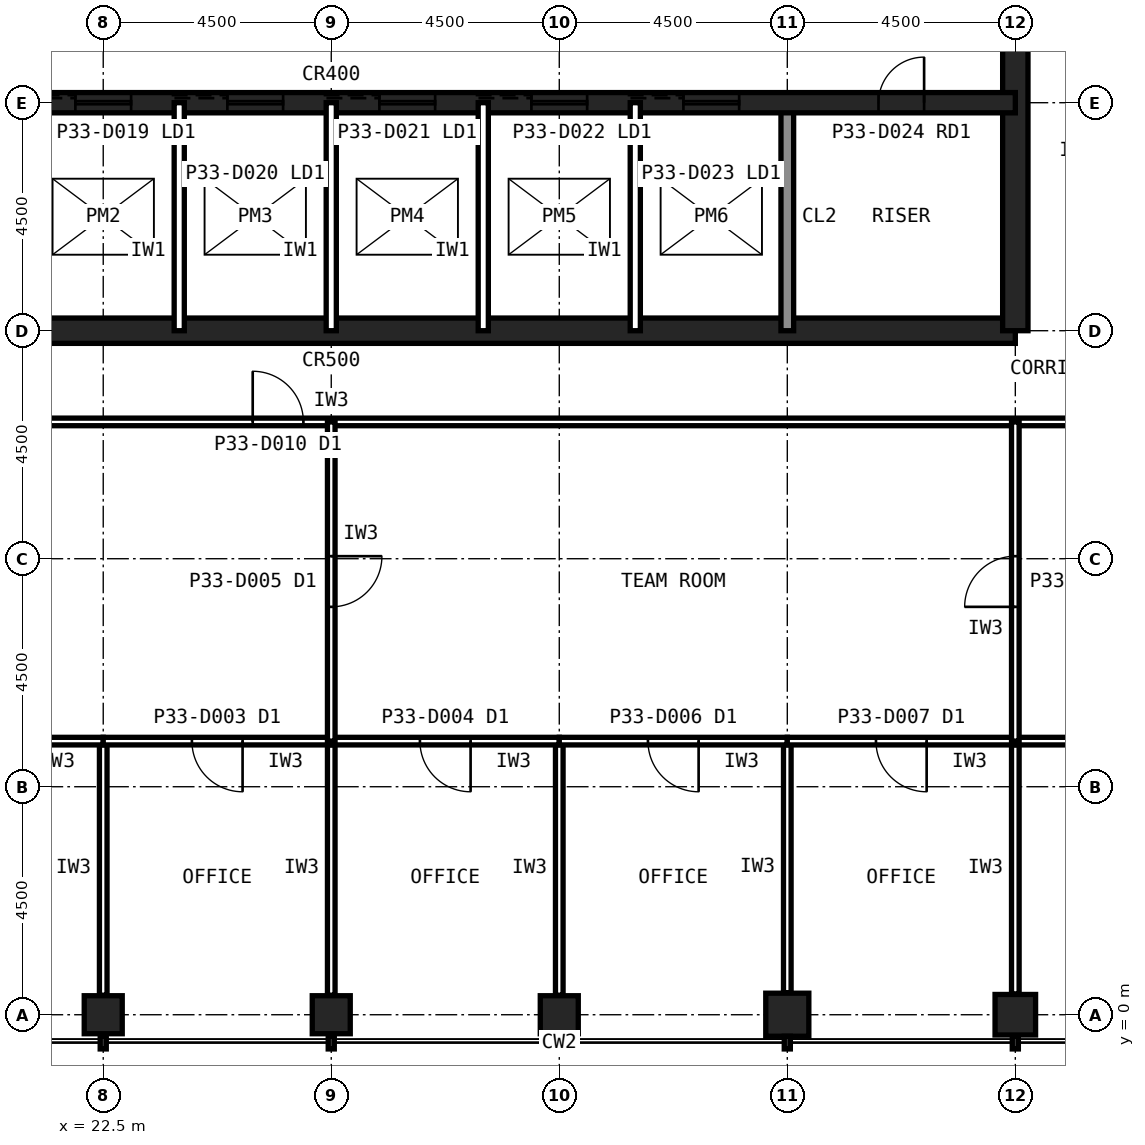
"""IFC4 building model, lengths in metres.
Left out: names, types, materials, properties, quantities, classifications, styles, units other than length and angle.
Written with IfcOpenShell. Run it as: python <this file> out.ifc"""

import sys

from ifc_helpers import new_model, si_unit, direction, frame, frame_2d, origin, origin_2d, place, context, subcontext, project, spatial, rectangle, hollow_rectangle, extrude, element, fill, save


model = new_model("IFC4")
c1 = context("Model", 3, precision=1e-05, world=origin(), true_north=direction((0.0, 1.0)))
c2 = subcontext(c1, "Body", "Model", "MODEL_VIEW")
j1 = project(units=[si_unit("LENGTHUNIT", "METRE"), si_unit("PLANEANGLEUNIT", "RADIAN")], contexts=[c1])
p1 = place(None, origin())
s1 = spatial("IfcSite", under=j1, at=p1, CompositionType="ELEMENT")
p2 = place(p1, origin())
s2 = spatial("IfcBuilding", under=s1, at=p2, CompositionType="ELEMENT")
p3 = place(p2, frame((0.0, 0.0, 143.6)))
s3 = spatial("IfcBuildingStorey", under=s2, at=p3, CompositionType="ELEMENT", Elevation=143.6)
for number, where, z_axis, x_axis in (
    (1, (22.5, 0.0, 0.0), (0.0, 0.0, 1.0), (1.0, 0.0, 0.0)),
    (2, (27.0, 0.0, 0.0), (0.0, 0.0, 1.0), (1.0, 0.0, 0.0)),
    (3, (31.5, 0.0, 0.0), (0.0, 0.0, 1.0), (1.0, 0.0, 0.0)),
):
    element("IfcColumn", number, at=place(p3, frame(where, z_axis=z_axis, x_axis=x_axis)), inside=s3, PredefinedType="COLUMN", context=c2, shape_type="SweptSolid", body=[
        extrude(hollow_rectangle(XDim=0.75, YDim=0.75, WallThickness=0.04, at=origin_2d()), origin(), (0.0, 0.0, 1.0), 4.0),
    ])
p4 = place(p3, frame((36.0, 0.0, 0.0), z_axis=(0.0, 0.0, 1.0), x_axis=(1.0, 0.0, 0.0)))
e4 = element("IfcColumn", 4, at=p4, inside=s3, PredefinedType="COLUMN", context=c2, shape_type="SweptSolid", body=[
    extrude(hollow_rectangle(XDim=0.85, YDim=0.85, WallThickness=0.05, at=origin_2d()), origin(), (0.0, 0.0, 1.0), 4.0),
])
p5 = place(p3, frame((40.5, 0.0, 0.0), z_axis=(0.0, 0.0, 1.0), x_axis=(1.0, 0.0, 0.0)))
e5 = element("IfcColumn", 5, at=p5, inside=s3, PredefinedType="COLUMN", context=c2, shape_type="SweptSolid", body=[
    extrude(hollow_rectangle(XDim=0.8, YDim=0.8, WallThickness=0.045, at=origin_2d()), origin(), (0.0, 0.0, 1.0), 4.0),
])
p6 = place(p3, frame((13.5, 13.5, 0.0), z_axis=(0.0, 0.0, 1.0), x_axis=(1.0, 0.0, 0.0)))
e6 = element("IfcWall", 6, at=p6, inside=s3, PredefinedType="SHEAR", context=c2, shape_type="SweptSolid", body=[
    extrude(rectangle(XDim=27.0, YDim=0.5, at=frame_2d((13.5, 0.0))), origin(), (0.0, 0.0, 1.0), 4.0),
])
p7 = place(p3, frame((40.5, 13.5, 0.0), z_axis=(0.0, 0.0, 1.0), x_axis=(0.0, 1.0, 0.0)))
e7 = element("IfcWall", 7, at=p7, inside=s3, PredefinedType="SHEAR", context=c2, shape_type="SweptSolid", body=[
    extrude(rectangle(XDim=27.0, YDim=0.5, at=frame_2d((13.5, 0.0))), origin(), (0.0, 0.0, 1.0), 4.0),
])
p8 = place(p7, frame((5.85, 0.0, 0.0)))
e8 = element("IfcOpeningElement", 8, at=p8, cuts=e7, PredefinedType="OPENING", context=c2, shape_type="SweptSolid", body=[
    extrude(rectangle(XDim=1.8, YDim=2.1, at=frame_2d((0.9, 1.05))), frame((0.0, 0.26, 0.0), z_axis=(0.0, -1.0, 0.0), x_axis=(1.0, 0.0, 0.0)), (0.0, 0.0, 1.0), 0.52),
])
p9 = place(p7, frame((19.65, 0.0, 0.0)))
e9 = element("IfcOpeningElement", 9, at=p9, cuts=e7, PredefinedType="OPENING", context=c2, shape_type="SweptSolid", body=[
    extrude(rectangle(XDim=1.2, YDim=2.1, at=frame_2d((0.6, 1.05))), frame((0.0, 0.26, 0.0), z_axis=(0.0, -1.0, 0.0), x_axis=(1.0, 0.0, 0.0)), (0.0, 0.0, 1.0), 0.52),
])
p10 = place(p3, frame((36.0, 13.5, 0.0), z_axis=(0.0, 0.0, 1.0), x_axis=(0.0, 1.0, 0.0)))
e10 = element("IfcWall", 10, at=p10, inside=s3, PredefinedType="SOLIDWALL", context=c2, shape_type="SweptSolid", body=[
    extrude(rectangle(XDim=4.5, YDim=0.25, at=frame_2d((2.25, 0.0))), origin(), (0.0, 0.0, 1.0), 3.84),
])
p11 = place(p3, frame((13.5, 18.0, 0.0), z_axis=(0.0, 0.0, 1.0), x_axis=(1.0, 0.0, 0.0)))
e11 = element("IfcWall", 11, at=p11, inside=s3, PredefinedType="SHEAR", context=c2, shape_type="SweptSolid", body=[
    extrude(rectangle(XDim=27.0, YDim=0.4, at=frame_2d((13.5, 0.0))), origin(), (0.0, 0.0, 1.0), 4.0),
])
p12 = place(p11, frame((24.3, 0.0, 0.0)))
e12 = element("IfcOpeningElement", 12, at=p12, cuts=e11, PredefinedType="OPENING", context=c2, shape_type="SweptSolid", body=[
    extrude(rectangle(XDim=0.9, YDim=2.1, at=frame_2d((0.45, 1.05))), frame((0.0, 0.21, 0.0), z_axis=(0.0, -1.0, 0.0), x_axis=(1.0, 0.0, 0.0)), (0.0, 0.0, 1.0), 0.42),
])
p13 = place(p11, frame((5.45, 0.0, 0.0)))
e13 = element("IfcOpeningElement", 13, at=p13, cuts=e11, PredefinedType="OPENING", context=c2, shape_type="SweptSolid", body=[
    extrude(rectangle(XDim=1.1, YDim=2.1, at=frame_2d((0.55, 1.05))), frame((0.0, 0.21, 0.0), z_axis=(0.0, -1.0, 0.0), x_axis=(1.0, 0.0, 0.0)), (0.0, 0.0, 1.0), 0.42),
])
p14 = place(p11, frame((8.45, 0.0, 0.0)))
e14 = element("IfcOpeningElement", 14, at=p14, cuts=e11, PredefinedType="OPENING", context=c2, shape_type="SweptSolid", body=[
    extrude(rectangle(XDim=1.1, YDim=2.1, at=frame_2d((0.55, 1.05))), frame((0.0, 0.21, 0.0), z_axis=(0.0, -1.0, 0.0), x_axis=(1.0, 0.0, 0.0)), (0.0, 0.0, 1.0), 0.42),
])
p15 = place(p11, frame((11.45, 0.0, 0.0)))
e15 = element("IfcOpeningElement", 15, at=p15, cuts=e11, PredefinedType="OPENING", context=c2, shape_type="SweptSolid", body=[
    extrude(rectangle(XDim=1.1, YDim=2.1, at=frame_2d((0.55, 1.05))), frame((0.0, 0.21, 0.0), z_axis=(0.0, -1.0, 0.0), x_axis=(1.0, 0.0, 0.0)), (0.0, 0.0, 1.0), 0.42),
])
p16 = place(p11, frame((14.45, 0.0, 0.0)))
e16 = element("IfcOpeningElement", 16, at=p16, cuts=e11, PredefinedType="OPENING", context=c2, shape_type="SweptSolid", body=[
    extrude(rectangle(XDim=1.1, YDim=2.1, at=frame_2d((0.55, 1.05))), frame((0.0, 0.21, 0.0), z_axis=(0.0, -1.0, 0.0), x_axis=(1.0, 0.0, 0.0)), (0.0, 0.0, 1.0), 0.42),
])
p17 = place(p11, frame((17.45, 0.0, 0.0)))
e17 = element("IfcOpeningElement", 17, at=p17, cuts=e11, PredefinedType="OPENING", context=c2, shape_type="SweptSolid", body=[
    extrude(rectangle(XDim=1.1, YDim=2.1, at=frame_2d((0.55, 1.05))), frame((0.0, 0.21, 0.0), z_axis=(0.0, -1.0, 0.0), x_axis=(1.0, 0.0, 0.0)), (0.0, 0.0, 1.0), 0.42),
])
p18 = place(p11, frame((20.45, 0.0, 0.0)))
e18 = element("IfcOpeningElement", 18, at=p18, cuts=e11, PredefinedType="OPENING", context=c2, shape_type="SweptSolid", body=[
    extrude(rectangle(XDim=1.1, YDim=2.1, at=frame_2d((0.55, 1.05))), frame((0.0, 0.21, 0.0), z_axis=(0.0, -1.0, 0.0), x_axis=(1.0, 0.0, 0.0)), (0.0, 0.0, 1.0), 0.42),
])
p19 = place(p11, frame((1.6, 0.0, 0.0)))
e19 = element("IfcOpeningElement", 19, at=p19, cuts=e11, PredefinedType="OPENING", context=c2, shape_type="SweptSolid", body=[
    extrude(rectangle(XDim=1.3, YDim=2.2, at=frame_2d((0.65, 1.1))), frame((0.0, 0.21, 0.0), z_axis=(0.0, -1.0, 0.0), x_axis=(1.0, 0.0, 0.0)), (0.0, 0.0, 1.0), 0.42),
])
for number, where, z_axis, x_axis in (
    (20, (24.0, 13.5, 0.0), (0.0, 0.0, 1.0), (0.0, 1.0, 0.0)),
    (21, (27.0, 13.5, 0.0), (0.0, 0.0, 1.0), (0.0, 1.0, 0.0)),
    (22, (30.0, 13.5, 0.0), (0.0, 0.0, 1.0), (0.0, 1.0, 0.0)),
    (23, (33.0, 13.5, 0.0), (0.0, 0.0, 1.0), (0.0, 1.0, 0.0)),
):
    element("IfcWall", number, at=place(p3, frame(where, z_axis=z_axis, x_axis=x_axis)), inside=s3, PredefinedType="PARTITIONING", context=c2, shape_type="SweptSolid", body=[
        extrude(rectangle(XDim=4.5, YDim=0.2, at=frame_2d((2.25, 0.0))), origin(), (0.0, 0.0, 1.0), 3.84),
    ])
p20 = place(p3, frame((11.7, 11.7, 0.0), z_axis=(0.0, 0.0, 1.0), x_axis=(1.0, 0.0, 0.0)))
e24 = element("IfcWall", 24, at=p20, inside=s3, PredefinedType="PARTITIONING", context=c2, shape_type="SweptSolid", body=[
    extrude(rectangle(XDim=30.6, YDim=0.15, at=frame_2d((15.3, 0.0))), origin(), (0.0, 0.0, 1.0), 3.84),
])
p21 = place(p20, frame((13.75, 0.0, 0.0)))
e25 = element("IfcOpeningElement", 25, at=p21, cuts=e24, PredefinedType="OPENING", context=c2, shape_type="SweptSolid", body=[
    extrude(rectangle(XDim=1.0, YDim=2.1, at=frame_2d((0.5, 1.05))), frame((0.0, 0.085, 0.0), z_axis=(0.0, -1.0, 0.0), x_axis=(1.0, 0.0, 0.0)), (0.0, 0.0, 1.0), 0.17),
])
p22 = place(p3, frame((22.5, 0.385, 0.0), z_axis=(0.0, 0.0, 1.0), x_axis=(0.0, 1.0, 0.0)))
e26 = element("IfcWall", 26, at=p22, inside=s3, PredefinedType="PARTITIONING", context=c2, shape_type="SweptSolid", body=[
    extrude(rectangle(XDim=5.015, YDim=0.15, at=frame_2d((2.507, 0.0))), origin(), (0.0, 0.0, 1.0), 2.989),
])
p23 = place(p3, frame((22.5, 5.4, 0.0), z_axis=(0.0, 0.0, 1.0), x_axis=(-1.0, 0.0, 0.0)))
e27 = element("IfcWall", 27, at=p23, inside=s3, PredefinedType="PARTITIONING", context=c2, shape_type="SweptSolid", body=[
    extrude(rectangle(XDim=4.5, YDim=0.15, at=frame_2d((2.25, 0.0))), origin(), (0.0, 0.0, 1.0), 3.84),
])
p24 = place(p23, frame((1.75, 0.0, 0.0)))
e28 = element("IfcOpeningElement", 28, at=p24, cuts=e27, PredefinedType="OPENING", context=c2, shape_type="SweptSolid", body=[
    extrude(rectangle(XDim=1.0, YDim=2.1, at=frame_2d((0.5, 1.05))), frame((0.0, 0.085, 0.0), z_axis=(0.0, -1.0, 0.0), x_axis=(1.0, 0.0, 0.0)), (0.0, 0.0, 1.0), 0.17),
])
p25 = place(p3, frame((27.0, 0.385, 0.0), z_axis=(0.0, 0.0, 1.0), x_axis=(0.0, 1.0, 0.0)))
e29 = element("IfcWall", 29, at=p25, inside=s3, PredefinedType="PARTITIONING", context=c2, shape_type="SweptSolid", body=[
    extrude(rectangle(XDim=5.015, YDim=0.15, at=frame_2d((2.507, 0.0))), origin(), (0.0, 0.0, 1.0), 2.989),
])
p26 = place(p3, frame((27.0, 5.4, 0.0), z_axis=(0.0, 0.0, 1.0), x_axis=(-1.0, 0.0, 0.0)))
e30 = element("IfcWall", 30, at=p26, inside=s3, PredefinedType="PARTITIONING", context=c2, shape_type="SweptSolid", body=[
    extrude(rectangle(XDim=4.5, YDim=0.15, at=frame_2d((2.25, 0.0))), origin(), (0.0, 0.0, 1.0), 3.84),
])
p27 = place(p26, frame((1.75, 0.0, 0.0)))
e31 = element("IfcOpeningElement", 31, at=p27, cuts=e30, PredefinedType="OPENING", context=c2, shape_type="SweptSolid", body=[
    extrude(rectangle(XDim=1.0, YDim=2.1, at=frame_2d((0.5, 1.05))), frame((0.0, 0.085, 0.0), z_axis=(0.0, -1.0, 0.0), x_axis=(1.0, 0.0, 0.0)), (0.0, 0.0, 1.0), 0.17),
])
p28 = place(p3, frame((31.5, 0.385, 0.0), z_axis=(0.0, 0.0, 1.0), x_axis=(0.0, 1.0, 0.0)))
e32 = element("IfcWall", 32, at=p28, inside=s3, PredefinedType="PARTITIONING", context=c2, shape_type="SweptSolid", body=[
    extrude(rectangle(XDim=5.015, YDim=0.15, at=frame_2d((2.507, 0.0))), origin(), (0.0, 0.0, 1.0), 2.989),
])
p29 = place(p3, frame((31.5, 5.4, 0.0), z_axis=(0.0, 0.0, 1.0), x_axis=(-1.0, 0.0, 0.0)))
e33 = element("IfcWall", 33, at=p29, inside=s3, PredefinedType="PARTITIONING", context=c2, shape_type="SweptSolid", body=[
    extrude(rectangle(XDim=4.5, YDim=0.15, at=frame_2d((2.25, 0.0))), origin(), (0.0, 0.0, 1.0), 3.84),
])
p30 = place(p29, frame((1.75, 0.0, 0.0)))
e34 = element("IfcOpeningElement", 34, at=p30, cuts=e33, PredefinedType="OPENING", context=c2, shape_type="SweptSolid", body=[
    extrude(rectangle(XDim=1.0, YDim=2.1, at=frame_2d((0.5, 1.05))), frame((0.0, 0.085, 0.0), z_axis=(0.0, -1.0, 0.0), x_axis=(1.0, 0.0, 0.0)), (0.0, 0.0, 1.0), 0.17),
])
p31 = place(p3, frame((36.0, 0.435, 0.0), z_axis=(0.0, 0.0, 1.0), x_axis=(0.0, 1.0, 0.0)))
e35 = element("IfcWall", 35, at=p31, inside=s3, PredefinedType="PARTITIONING", context=c2, shape_type="SweptSolid", body=[
    extrude(rectangle(XDim=4.965, YDim=0.15, at=frame_2d((2.482, 0.0))), origin(), (0.0, 0.0, 1.0), 2.989),
])
p32 = place(p3, frame((36.0, 5.4, 0.0), z_axis=(0.0, 0.0, 1.0), x_axis=(-1.0, 0.0, 0.0)))
e36 = element("IfcWall", 36, at=p32, inside=s3, PredefinedType="PARTITIONING", context=c2, shape_type="SweptSolid", body=[
    extrude(rectangle(XDim=4.5, YDim=0.15, at=frame_2d((2.25, 0.0))), origin(), (0.0, 0.0, 1.0), 3.84),
])
p33 = place(p32, frame((1.75, 0.0, 0.0)))
e37 = element("IfcOpeningElement", 37, at=p33, cuts=e36, PredefinedType="OPENING", context=c2, shape_type="SweptSolid", body=[
    extrude(rectangle(XDim=1.0, YDim=2.1, at=frame_2d((0.5, 1.05))), frame((0.0, 0.085, 0.0), z_axis=(0.0, -1.0, 0.0), x_axis=(1.0, 0.0, 0.0)), (0.0, 0.0, 1.0), 0.17),
])
p34 = place(p3, frame((40.5, 0.41, 0.0), z_axis=(0.0, 0.0, 1.0), x_axis=(0.0, 1.0, 0.0)))
e38 = element("IfcWall", 38, at=p34, inside=s3, PredefinedType="PARTITIONING", context=c2, shape_type="SweptSolid", body=[
    extrude(rectangle(XDim=4.99, YDim=0.15, at=frame_2d((2.495, 0.0))), origin(), (0.0, 0.0, 1.0), 2.989),
])
p35 = place(p3, frame((40.5, 5.4, 0.0), z_axis=(0.0, 0.0, 1.0), x_axis=(-1.0, 0.0, 0.0)))
e39 = element("IfcWall", 39, at=p35, inside=s3, PredefinedType="PARTITIONING", context=c2, shape_type="SweptSolid", body=[
    extrude(rectangle(XDim=4.5, YDim=0.15, at=frame_2d((2.25, 0.0))), origin(), (0.0, 0.0, 1.0), 3.84),
])
p36 = place(p35, frame((1.75, 0.0, 0.0)))
e40 = element("IfcOpeningElement", 40, at=p36, cuts=e39, PredefinedType="OPENING", context=c2, shape_type="SweptSolid", body=[
    extrude(rectangle(XDim=1.0, YDim=2.1, at=frame_2d((0.5, 1.05))), frame((0.0, 0.085, 0.0), z_axis=(0.0, -1.0, 0.0), x_axis=(1.0, 0.0, 0.0)), (0.0, 0.0, 1.0), 0.17),
])
p37 = place(p3, frame((45.0, 5.4, 0.0), z_axis=(0.0, 0.0, 1.0), x_axis=(-1.0, 0.0, 0.0)))
e41 = element("IfcWall", 41, at=p37, inside=s3, PredefinedType="PARTITIONING", context=c2, shape_type="SweptSolid", body=[
    extrude(rectangle(XDim=4.5, YDim=0.15, at=frame_2d((2.25, 0.0))), origin(), (0.0, 0.0, 1.0), 3.84),
])
p38 = place(p37, frame((1.75, 0.0, 0.0)))
e42 = element("IfcOpeningElement", 42, at=p38, cuts=e41, PredefinedType="OPENING", context=c2, shape_type="SweptSolid", body=[
    extrude(rectangle(XDim=1.0, YDim=2.1, at=frame_2d((0.5, 1.05))), frame((0.0, 0.085, 0.0), z_axis=(0.0, -1.0, 0.0), x_axis=(1.0, 0.0, 0.0)), (0.0, 0.0, 1.0), 0.17),
])
p39 = place(p3, frame((40.5, 5.4, 0.0), z_axis=(0.0, 0.0, 1.0), x_axis=(0.0, 1.0, 0.0)))
e43 = element("IfcWall", 43, at=p39, inside=s3, PredefinedType="PARTITIONING", context=c2, shape_type="SweptSolid", body=[
    extrude(rectangle(XDim=6.3, YDim=0.15, at=frame_2d((3.15, 0.0))), origin(), (0.0, 0.0, 1.0), 2.989),
])
p40 = place(p39, frame((2.65, 0.0, 0.0)))
e44 = element("IfcOpeningElement", 44, at=p40, cuts=e43, PredefinedType="OPENING", context=c2, shape_type="SweptSolid", body=[
    extrude(rectangle(XDim=1.0, YDim=2.1, at=frame_2d((0.5, 1.05))), frame((0.0, 0.085, 0.0), z_axis=(0.0, -1.0, 0.0), x_axis=(1.0, 0.0, 0.0)), (0.0, 0.0, 1.0), 0.17),
])
p41 = place(p3, frame((27.0, 11.7, 0.0), z_axis=(0.0, 0.0, 1.0), x_axis=(0.0, -1.0, 0.0)))
e45 = element("IfcWall", 45, at=p41, inside=s3, PredefinedType="PARTITIONING", context=c2, shape_type="SweptSolid", body=[
    extrude(rectangle(XDim=6.3, YDim=0.15, at=frame_2d((3.15, 0.0))), origin(), (0.0, 0.0, 1.0), 2.989),
])
p42 = place(p41, frame((2.65, 0.0, 0.0)))
e46 = element("IfcOpeningElement", 46, at=p42, cuts=e45, PredefinedType="OPENING", context=c2, shape_type="SweptSolid", body=[
    extrude(rectangle(XDim=1.0, YDim=2.1, at=frame_2d((0.5, 1.05))), frame((0.0, 0.085, 0.0), z_axis=(0.0, -1.0, 0.0), x_axis=(1.0, 0.0, 0.0)), (0.0, 0.0, 1.0), 0.17),
])
p43 = place(p12, origin())
e47 = element("IfcDoor", 47, at=p43, inside=s3, OperationType="SINGLE_SWING_RIGHT", PredefinedType="DOOR", context=c2, shape_type="SweptSolid", body=[
    extrude(rectangle(XDim=0.9, YDim=2.1, at=frame_2d((0.45, 1.05))), frame((0.0, 0.025, 0.0), z_axis=(0.0, -1.0, 0.0), x_axis=(1.0, 0.0, 0.0)), (0.0, 0.0, 1.0), 0.05),
])
fill(e12, e47)
p44 = place(p14, origin())
e48 = element("IfcDoor", 48, at=p44, inside=s3, OperationType="SLIDING_TO_LEFT", PredefinedType="DOOR", context=c2, shape_type="SweptSolid", body=[
    extrude(rectangle(XDim=1.1, YDim=2.1, at=frame_2d((0.55, 1.05))), frame((0.0, 0.025, 0.0), z_axis=(0.0, -1.0, 0.0), x_axis=(1.0, 0.0, 0.0)), (0.0, 0.0, 1.0), 0.05),
])
fill(e14, e48)
p45 = place(p15, origin())
e49 = element("IfcDoor", 49, at=p45, inside=s3, OperationType="SLIDING_TO_LEFT", PredefinedType="DOOR", context=c2, shape_type="SweptSolid", body=[
    extrude(rectangle(XDim=1.1, YDim=2.1, at=frame_2d((0.55, 1.05))), frame((0.0, 0.025, 0.0), z_axis=(0.0, -1.0, 0.0), x_axis=(1.0, 0.0, 0.0)), (0.0, 0.0, 1.0), 0.05),
])
fill(e15, e49)
p46 = place(p16, origin())
e50 = element("IfcDoor", 50, at=p46, inside=s3, OperationType="SLIDING_TO_LEFT", PredefinedType="DOOR", context=c2, shape_type="SweptSolid", body=[
    extrude(rectangle(XDim=1.1, YDim=2.1, at=frame_2d((0.55, 1.05))), frame((0.0, 0.025, 0.0), z_axis=(0.0, -1.0, 0.0), x_axis=(1.0, 0.0, 0.0)), (0.0, 0.0, 1.0), 0.05),
])
fill(e16, e50)
p47 = place(p17, origin())
e51 = element("IfcDoor", 51, at=p47, inside=s3, OperationType="SLIDING_TO_LEFT", PredefinedType="DOOR", context=c2, shape_type="SweptSolid", body=[
    extrude(rectangle(XDim=1.1, YDim=2.1, at=frame_2d((0.55, 1.05))), frame((0.0, 0.025, 0.0), z_axis=(0.0, -1.0, 0.0), x_axis=(1.0, 0.0, 0.0)), (0.0, 0.0, 1.0), 0.05),
])
fill(e17, e51)
p48 = place(p18, origin())
e52 = element("IfcDoor", 52, at=p48, inside=s3, OperationType="SLIDING_TO_LEFT", PredefinedType="DOOR", context=c2, shape_type="SweptSolid", body=[
    extrude(rectangle(XDim=1.1, YDim=2.1, at=frame_2d((0.55, 1.05))), frame((0.0, 0.025, 0.0), z_axis=(0.0, -1.0, 0.0), x_axis=(1.0, 0.0, 0.0)), (0.0, 0.0, 1.0), 0.05),
])
fill(e18, e52)
p49 = place(p21, origin())
e53 = element("IfcDoor", 53, at=p49, inside=s3, OperationType="SINGLE_SWING_LEFT", PredefinedType="DOOR", context=c2, shape_type="SweptSolid", body=[
    extrude(rectangle(XDim=1.0, YDim=2.1, at=frame_2d((0.5, 1.05))), frame((0.0, 0.025, 0.0), z_axis=(0.0, -1.0, 0.0), x_axis=(1.0, 0.0, 0.0)), (0.0, 0.0, 1.0), 0.05),
])
fill(e25, e53)
p50 = place(p27, origin())
e54 = element("IfcDoor", 54, at=p50, inside=s3, OperationType="SINGLE_SWING_LEFT", PredefinedType="DOOR", context=c2, shape_type="SweptSolid", body=[
    extrude(rectangle(XDim=1.0, YDim=2.1, at=frame_2d((0.5, 1.05))), frame((0.0, 0.025, 0.0), z_axis=(0.0, -1.0, 0.0), x_axis=(1.0, 0.0, 0.0)), (0.0, 0.0, 1.0), 0.05),
])
fill(e31, e54)
p51 = place(p30, origin())
e55 = element("IfcDoor", 55, at=p51, inside=s3, OperationType="SINGLE_SWING_LEFT", PredefinedType="DOOR", context=c2, shape_type="SweptSolid", body=[
    extrude(rectangle(XDim=1.0, YDim=2.1, at=frame_2d((0.5, 1.05))), frame((0.0, 0.025, 0.0), z_axis=(0.0, -1.0, 0.0), x_axis=(1.0, 0.0, 0.0)), (0.0, 0.0, 1.0), 0.05),
])
fill(e34, e55)
p52 = place(p33, origin())
e56 = element("IfcDoor", 56, at=p52, inside=s3, OperationType="SINGLE_SWING_LEFT", PredefinedType="DOOR", context=c2, shape_type="SweptSolid", body=[
    extrude(rectangle(XDim=1.0, YDim=2.1, at=frame_2d((0.5, 1.05))), frame((0.0, 0.025, 0.0), z_axis=(0.0, -1.0, 0.0), x_axis=(1.0, 0.0, 0.0)), (0.0, 0.0, 1.0), 0.05),
])
fill(e37, e56)
p53 = place(p36, origin())
e57 = element("IfcDoor", 57, at=p53, inside=s3, OperationType="SINGLE_SWING_LEFT", PredefinedType="DOOR", context=c2, shape_type="SweptSolid", body=[
    extrude(rectangle(XDim=1.0, YDim=2.1, at=frame_2d((0.5, 1.05))), frame((0.0, 0.025, 0.0), z_axis=(0.0, -1.0, 0.0), x_axis=(1.0, 0.0, 0.0)), (0.0, 0.0, 1.0), 0.05),
])
fill(e40, e57)
p54 = place(p40, origin())
e58 = element("IfcDoor", 58, at=p54, inside=s3, OperationType="SINGLE_SWING_LEFT", PredefinedType="DOOR", context=c2, shape_type="SweptSolid", body=[
    extrude(rectangle(XDim=1.0, YDim=2.1, at=frame_2d((0.5, 1.05))), frame((0.0, 0.025, 0.0), z_axis=(0.0, -1.0, 0.0), x_axis=(1.0, 0.0, 0.0)), (0.0, 0.0, 1.0), 0.05),
])
fill(e44, e58)
p55 = place(p42, origin())
e59 = element("IfcDoor", 59, at=p55, inside=s3, OperationType="SINGLE_SWING_LEFT", PredefinedType="DOOR", context=c2, shape_type="SweptSolid", body=[
    extrude(rectangle(XDim=1.0, YDim=2.1, at=frame_2d((0.5, 1.05))), frame((0.0, 0.025, 0.0), z_axis=(0.0, -1.0, 0.0), x_axis=(1.0, 0.0, 0.0)), (0.0, 0.0, 1.0), 0.05),
])
fill(e46, e59)
save(model, sys.argv[1])
